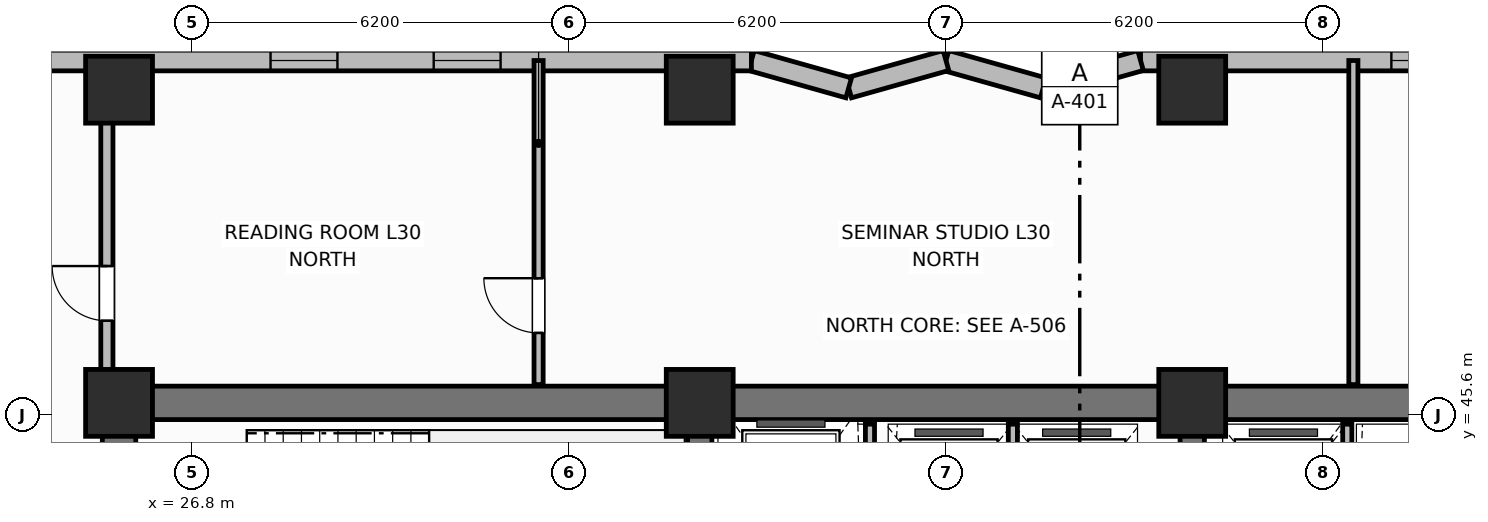
"""IFC4 building model, lengths in metres.
Left out: names, types, materials, properties, quantities, classifications, styles, units other than length and angle.
Written with IfcOpenShell. Run it as: python <this file> out.ifc"""

import sys

from ifc_helpers import new_model, si_unit, direction, frame, frame_2d, origin, origin_2d, place, context, subcontext, project, spatial, rectangle, extrude, element, fill, save


model = new_model("IFC4")
c1 = context("Model", 3, precision=1e-05, world=origin(), true_north=direction((0.0, 1.0)))
c2 = subcontext(c1, "Body", "Model", "MODEL_VIEW")
j1 = project(units=[si_unit("LENGTHUNIT", "METRE"), si_unit("PLANEANGLEUNIT", "RADIAN")], contexts=[c1])
p1 = place(None, origin())
s1 = spatial("IfcSite", under=j1, at=p1, CompositionType="ELEMENT")
p2 = place(p1, origin())
s2 = spatial("IfcBuilding", under=s1, at=p2, CompositionType="ELEMENT")
p3 = place(p2, frame((0.0, 0.0, 121.6)))
s3 = spatial("IfcBuildingStorey", under=s2, at=p3, CompositionType="ELEMENT", Elevation=121.6)
p4 = place(p3, frame((25.6, 45.8, 0.0), z_axis=(0.0, 0.0, 1.0), x_axis=(1.0, 0.0, 0.0)))
e1 = element("IfcWall", 1, at=p4, inside=s3, PredefinedType="SHEAR", context=c2, shape_type="SweptSolid", body=[
    extrude(rectangle(XDim=27.2, YDim=0.55, at=frame_2d((13.6, 0.0))), origin(), (0.0, 0.0, 1.0), 3.7),
])
p5 = place(p3, frame((25.6, 39.875, 0.0), z_axis=(0.0, 0.0, 1.0), x_axis=(0.0, 1.0, 0.0)))
e2 = element("IfcWall", 2, at=p5, inside=s3, PredefinedType="SHEAR", context=c2, shape_type="SweptSolid", body=[
    extrude(rectangle(XDim=5.65, YDim=0.55, at=frame_2d((2.825, 0.0))), origin(), (0.0, 0.0, 1.0), 3.7),
])
for number, where, z_axis, x_axis in (
    (3, (35.15, 39.875, 0.0), (0.0, 0.0, 1.0), (0.0, 1.0, 0.0)),
    (4, (43.25, 39.875, 0.0), (0.0, 0.0, 1.0), (0.0, 1.0, 0.0)),
):
    element("IfcWall", number, at=place(p3, frame(where, z_axis=z_axis, x_axis=x_axis)), inside=s3, PredefinedType="SHEAR", context=c2, shape_type="SweptSolid", body=[
        extrude(rectangle(XDim=5.65, YDim=0.4, at=frame_2d((2.825, 0.0))), origin(), (0.0, 0.0, 1.0), 3.7),
    ])
for number, where, z_axis, x_axis in (
    (5, (25.6, 45.8, 0.0), (0.0, 0.0, 1.0), (1.0, 0.0, 0.0)),
    (6, (35.15, 45.8, 0.0), (0.0, 0.0, 1.0), (1.0, 0.0, 0.0)),
    (7, (43.25, 45.8, 0.0), (0.0, 0.0, 1.0), (1.0, 0.0, 0.0)),
    (8, (25.6, 50.95, 0.0), (0.0, 0.0, 1.0), (1.0, 0.0, 0.0)),
    (9, (35.15, 50.95, 0.0), (0.0, 0.0, 1.0), (1.0, 0.0, 0.0)),
    (10, (43.25, 50.95, 0.0), (0.0, 0.0, 1.0), (1.0, 0.0, 0.0)),
):
    element("IfcColumn", number, at=place(p3, frame(where, z_axis=z_axis, x_axis=x_axis)), inside=s3, PredefinedType="COLUMN", context=c2, shape_type="SweptSolid", body=[
        extrude(rectangle(XDim=1.1, YDim=1.1, at=origin_2d()), origin(), (0.0, 0.0, 1.0), 3.7),
    ])
p6 = place(p3, frame((59.8, 51.43, 0.0), z_axis=(0.0, 0.0, 1.0), x_axis=(-1.0, 0.0, 0.0)))
e11 = element("IfcWall", 11, at=p6, inside=s3, PredefinedType="SOLIDWALL", context=c2, shape_type="SweptSolid", body=[
    extrude(rectangle(XDim=17.4, YDim=0.34, at=frame_2d((8.7, 0.0))), origin(), (0.0, 0.0, 1.0), 2.7),
])
p7 = place(p6, frame((1.442, 0.0, 0.93)))
e12 = element("IfcOpeningElement", 12, at=p7, cuts=e11, PredefinedType="OPENING", context=c2, shape_type="SweptSolid", body=[
    extrude(rectangle(XDim=1.1, YDim=1.65, at=frame_2d((0.55, 0.825))), frame((0.0, 0.18, 0.0), z_axis=(0.0, -1.0, 0.0), x_axis=(1.0, 0.0, 0.0)), (0.0, 0.0, 1.0), 0.36),
])
p8 = place(p6, frame((3.425, 0.0, 0.93)))
e13 = element("IfcOpeningElement", 13, at=p8, cuts=e11, PredefinedType="OPENING", context=c2, shape_type="SweptSolid", body=[
    extrude(rectangle(XDim=1.1, YDim=1.65, at=frame_2d((0.55, 0.825))), frame((0.0, 0.18, 0.0), z_axis=(0.0, -1.0, 0.0), x_axis=(1.0, 0.0, 0.0)), (0.0, 0.0, 1.0), 0.36),
])
p9 = place(p6, frame((9.492, 0.0, 0.93)))
e14 = element("IfcOpeningElement", 14, at=p9, cuts=e11, PredefinedType="OPENING", context=c2, shape_type="SweptSolid", body=[
    extrude(rectangle(XDim=1.1, YDim=1.65, at=frame_2d((0.55, 0.825))), frame((0.0, 0.18, 0.0), z_axis=(0.0, -1.0, 0.0), x_axis=(1.0, 0.0, 0.0)), (0.0, 0.0, 1.0), 0.36),
])
p10 = place(p6, frame((12.175, 0.0, 0.93)))
e15 = element("IfcOpeningElement", 15, at=p10, cuts=e11, PredefinedType="OPENING", context=c2, shape_type="SweptSolid", body=[
    extrude(rectangle(XDim=1.1, YDim=1.65, at=frame_2d((0.55, 0.825))), frame((0.0, 0.18, 0.0), z_axis=(0.0, -1.0, 0.0), x_axis=(1.0, 0.0, 0.0)), (0.0, 0.0, 1.0), 0.36),
])
p11 = place(p3, frame((42.4, 51.43, 0.0), z_axis=(0.0, 0.0, 1.0), x_axis=(-0.962652136636, -0.270741322725, 0.0)))
e16 = element("IfcWall", 16, at=p11, inside=s3, PredefinedType="SOLIDWALL", context=c2, shape_type="SweptSolid", body=[
    extrude(rectangle(XDim=1.662, YDim=0.34, at=frame_2d((0.831, 0.0))), origin(), (0.0, 0.0, 1.0), 2.7),
])
p12 = place(p3, frame((40.8, 50.98, 0.0), z_axis=(0.0, 0.0, 1.0), x_axis=(-0.962662902433, 0.270703040766, 0.0)))
e17 = element("IfcWall", 17, at=p12, inside=s3, PredefinedType="SOLIDWALL", context=c2, shape_type="SweptSolid", body=[
    extrude(rectangle(XDim=1.662, YDim=0.34, at=frame_2d((0.831, 0.0))), origin(), (0.0, 0.0, 1.0), 2.7),
])
p13 = place(p3, frame((39.2, 51.43, 0.0), z_axis=(0.0, 0.0, 1.0), x_axis=(-0.962652136636, -0.270741322725, 0.0)))
e18 = element("IfcWall", 18, at=p13, inside=s3, PredefinedType="SOLIDWALL", context=c2, shape_type="SweptSolid", body=[
    extrude(rectangle(XDim=1.662, YDim=0.34, at=frame_2d((0.831, 0.0))), origin(), (0.0, 0.0, 1.0), 2.7),
])
p14 = place(p3, frame((37.6, 50.98, 0.0), z_axis=(0.0, 0.0, 1.0), x_axis=(-0.962662902433, 0.270703040766, 0.0)))
e19 = element("IfcWall", 19, at=p14, inside=s3, PredefinedType="SOLIDWALL", context=c2, shape_type="SweptSolid", body=[
    extrude(rectangle(XDim=1.662, YDim=0.34, at=frame_2d((0.831, 0.0))), origin(), (0.0, 0.0, 1.0), 2.7),
])
p15 = place(p3, frame((36.0, 51.43, 0.0), z_axis=(0.0, 0.0, 1.0), x_axis=(-1.0, 0.0, 0.0)))
e20 = element("IfcWall", 20, at=p15, inside=s3, PredefinedType="SOLIDWALL", context=c2, shape_type="SweptSolid", body=[
    extrude(rectangle(XDim=17.4, YDim=0.34, at=frame_2d((8.7, 0.0))), origin(), (0.0, 0.0, 1.0), 2.7),
])
p16 = place(p15, frame((4.125, 0.0, 0.93)))
e21 = element("IfcOpeningElement", 21, at=p16, cuts=e20, PredefinedType="OPENING", context=c2, shape_type="SweptSolid", body=[
    extrude(rectangle(XDim=1.1, YDim=1.65, at=frame_2d((0.55, 0.825))), frame((0.0, 0.18, 0.0), z_axis=(0.0, -1.0, 0.0), x_axis=(1.0, 0.0, 0.0)), (0.0, 0.0, 1.0), 0.36),
])
p17 = place(p15, frame((6.808, 0.0, 0.93)))
e22 = element("IfcOpeningElement", 22, at=p17, cuts=e20, PredefinedType="OPENING", context=c2, shape_type="SweptSolid", body=[
    extrude(rectangle(XDim=1.1, YDim=1.65, at=frame_2d((0.55, 0.825))), frame((0.0, 0.18, 0.0), z_axis=(0.0, -1.0, 0.0), x_axis=(1.0, 0.0, 0.0)), (0.0, 0.0, 1.0), 0.36),
])
p18 = place(p15, frame((13.225, 0.0, 0.93)))
e23 = element("IfcOpeningElement", 23, at=p18, cuts=e20, PredefinedType="OPENING", context=c2, shape_type="SweptSolid", body=[
    extrude(rectangle(XDim=1.1, YDim=1.65, at=frame_2d((0.55, 0.825))), frame((0.0, 0.18, 0.0), z_axis=(0.0, -1.0, 0.0), x_axis=(1.0, 0.0, 0.0)), (0.0, 0.0, 1.0), 0.36),
])
p19 = place(p15, frame((14.858, 0.0, 0.93)))
e24 = element("IfcOpeningElement", 24, at=p19, cuts=e20, PredefinedType="OPENING", context=c2, shape_type="SweptSolid", body=[
    extrude(rectangle(XDim=1.1, YDim=1.65, at=frame_2d((0.55, 0.825))), frame((0.0, 0.18, 0.0), z_axis=(0.0, -1.0, 0.0), x_axis=(1.0, 0.0, 0.0)), (0.0, 0.0, 1.0), 0.36),
])
p20 = place(p3, frame((37.95, 42.6, 0.0), z_axis=(0.0, 0.0, 1.0), x_axis=(0.0, 1.0, 0.0)))
e25 = element("IfcWall", 25, at=p20, inside=s3, PredefinedType="PARTITIONING", context=c2, shape_type="SweptSolid", body=[
    extrude(rectangle(XDim=2.85, YDim=0.15, at=frame_2d((1.425, 0.0))), origin(), (0.0, 0.0, 1.0), 2.53),
])
for number, where, z_axis, x_axis in (
    (26, (40.3, 42.65, 0.0), (0.0, 0.0, 1.0), (0.0, 1.0, 0.0)),
    (27, (45.8, 42.65, 0.0), (0.0, 0.0, 1.0), (0.0, 1.0, 0.0)),
):
    element("IfcWall", number, at=place(p3, frame(where, z_axis=z_axis, x_axis=x_axis)), inside=s3, PredefinedType="PARTITIONING", context=c2, shape_type="SweptSolid", body=[
        extrude(rectangle(XDim=2.8, YDim=0.15, at=frame_2d((1.4, 0.0))), origin(), (0.0, 0.0, 1.0), 2.53),
    ])
p21 = place(p3, frame((32.5, 46.1, 0.0), z_axis=(0.0, 0.0, 1.0), x_axis=(0.0, 1.0, 0.0)))
e28 = element("IfcWall", 28, at=p21, inside=s3, PredefinedType="PARTITIONING", context=c2, shape_type="SweptSolid", body=[
    extrude(rectangle(XDim=5.33, YDim=0.15, at=frame_2d((2.665, 0.0))), origin(), (0.0, 0.0, 1.0), 2.53),
])
p22 = place(p21, frame((0.85, 0.0, 0.0)))
e29 = element("IfcOpeningElement", 29, at=p22, cuts=e28, PredefinedType="OPENING", context=c2, shape_type="SweptSolid", body=[
    extrude(rectangle(XDim=0.9, YDim=2.1, at=frame_2d((0.45, 1.05))), frame((0.0, 0.085, 0.0), z_axis=(0.0, -1.0, 0.0), x_axis=(1.0, 0.0, 0.0)), (0.0, 0.0, 1.0), 0.17),
])
p23 = place(p3, frame((45.9, 46.1, 0.0), z_axis=(0.0, 0.0, 1.0), x_axis=(0.0, 1.0, 0.0)))
e30 = element("IfcWall", 30, at=p23, inside=s3, PredefinedType="PARTITIONING", context=c2, shape_type="SweptSolid", body=[
    extrude(rectangle(XDim=5.33, YDim=0.15, at=frame_2d((2.665, 0.0))), origin(), (0.0, 0.0, 1.0), 2.53),
])
p24 = place(p3, frame((25.4, 46.1, 0.0), z_axis=(0.0, 0.0, 1.0), x_axis=(0.0, 1.0, 0.0)))
e31 = element("IfcWall", 31, at=p24, inside=s3, PredefinedType="PARTITIONING", context=c2, shape_type="SweptSolid", body=[
    extrude(rectangle(XDim=4.53, YDim=0.2, at=frame_2d((2.265, 0.0))), origin(), (0.0, 0.0, 1.0), 2.53),
])
p25 = place(p24, frame((1.05, 0.0, 0.0)))
e32 = element("IfcOpeningElement", 32, at=p25, cuts=e31, PredefinedType="OPENING", context=c2, shape_type="SweptSolid", body=[
    extrude(rectangle(XDim=0.9, YDim=2.1, at=frame_2d((0.45, 1.05))), frame((0.0, 0.11, 0.0), z_axis=(0.0, -1.0, 0.0), x_axis=(1.0, 0.0, 0.0)), (0.0, 0.0, 1.0), 0.22),
])
p26 = place(p10, origin())
e33 = element("IfcWindow", 33, at=p26, inside=s3, PartitioningType="SINGLE_PANEL", PredefinedType="WINDOW", context=c2, shape_type="SweptSolid", body=[
    extrude(rectangle(XDim=1.1, YDim=1.65, at=frame_2d((0.55, 0.825))), frame((0.0, 0.03, 0.0), z_axis=(0.0, -1.0, 0.0), x_axis=(1.0, 0.0, 0.0)), (0.0, 0.0, 1.0), 0.06),
])
fill(e15, e33)
p27 = place(p16, origin())
e34 = element("IfcWindow", 34, at=p27, inside=s3, PartitioningType="SINGLE_PANEL", PredefinedType="WINDOW", context=c2, shape_type="SweptSolid", body=[
    extrude(rectangle(XDim=1.1, YDim=1.65, at=frame_2d((0.55, 0.825))), frame((0.0, 0.03, 0.0), z_axis=(0.0, -1.0, 0.0), x_axis=(1.0, 0.0, 0.0)), (0.0, 0.0, 1.0), 0.06),
])
fill(e21, e34)
p28 = place(p17, origin())
e35 = element("IfcWindow", 35, at=p28, inside=s3, PartitioningType="SINGLE_PANEL", PredefinedType="WINDOW", context=c2, shape_type="SweptSolid", body=[
    extrude(rectangle(XDim=1.1, YDim=1.65, at=frame_2d((0.55, 0.825))), frame((0.0, 0.03, 0.0), z_axis=(0.0, -1.0, 0.0), x_axis=(1.0, 0.0, 0.0)), (0.0, 0.0, 1.0), 0.06),
])
fill(e22, e35)
p29 = place(p22, origin())
e36 = element("IfcDoor", 36, at=p29, inside=s3, OperationType="SINGLE_SWING_RIGHT", PredefinedType="DOOR", context=c2, shape_type="SweptSolid", body=[
    extrude(rectangle(XDim=0.9, YDim=2.1, at=frame_2d((0.45, 1.05))), frame((0.0, 0.025, 0.0), z_axis=(0.0, -1.0, 0.0), x_axis=(1.0, 0.0, 0.0)), (0.0, 0.0, 1.0), 0.05),
])
fill(e29, e36)
p30 = place(p25, origin())
e37 = element("IfcDoor", 37, at=p30, inside=s3, OperationType="SINGLE_SWING_RIGHT", PredefinedType="DOOR", context=c2, shape_type="SweptSolid", body=[
    extrude(rectangle(XDim=0.9, YDim=2.1, at=frame_2d((0.45, 1.05))), frame((0.0, 0.025, 0.0), z_axis=(0.0, -1.0, 0.0), x_axis=(1.0, 0.0, 0.0)), (0.0, 0.0, 1.0), 0.05),
])
fill(e32, e37)
save(model, sys.argv[1])
